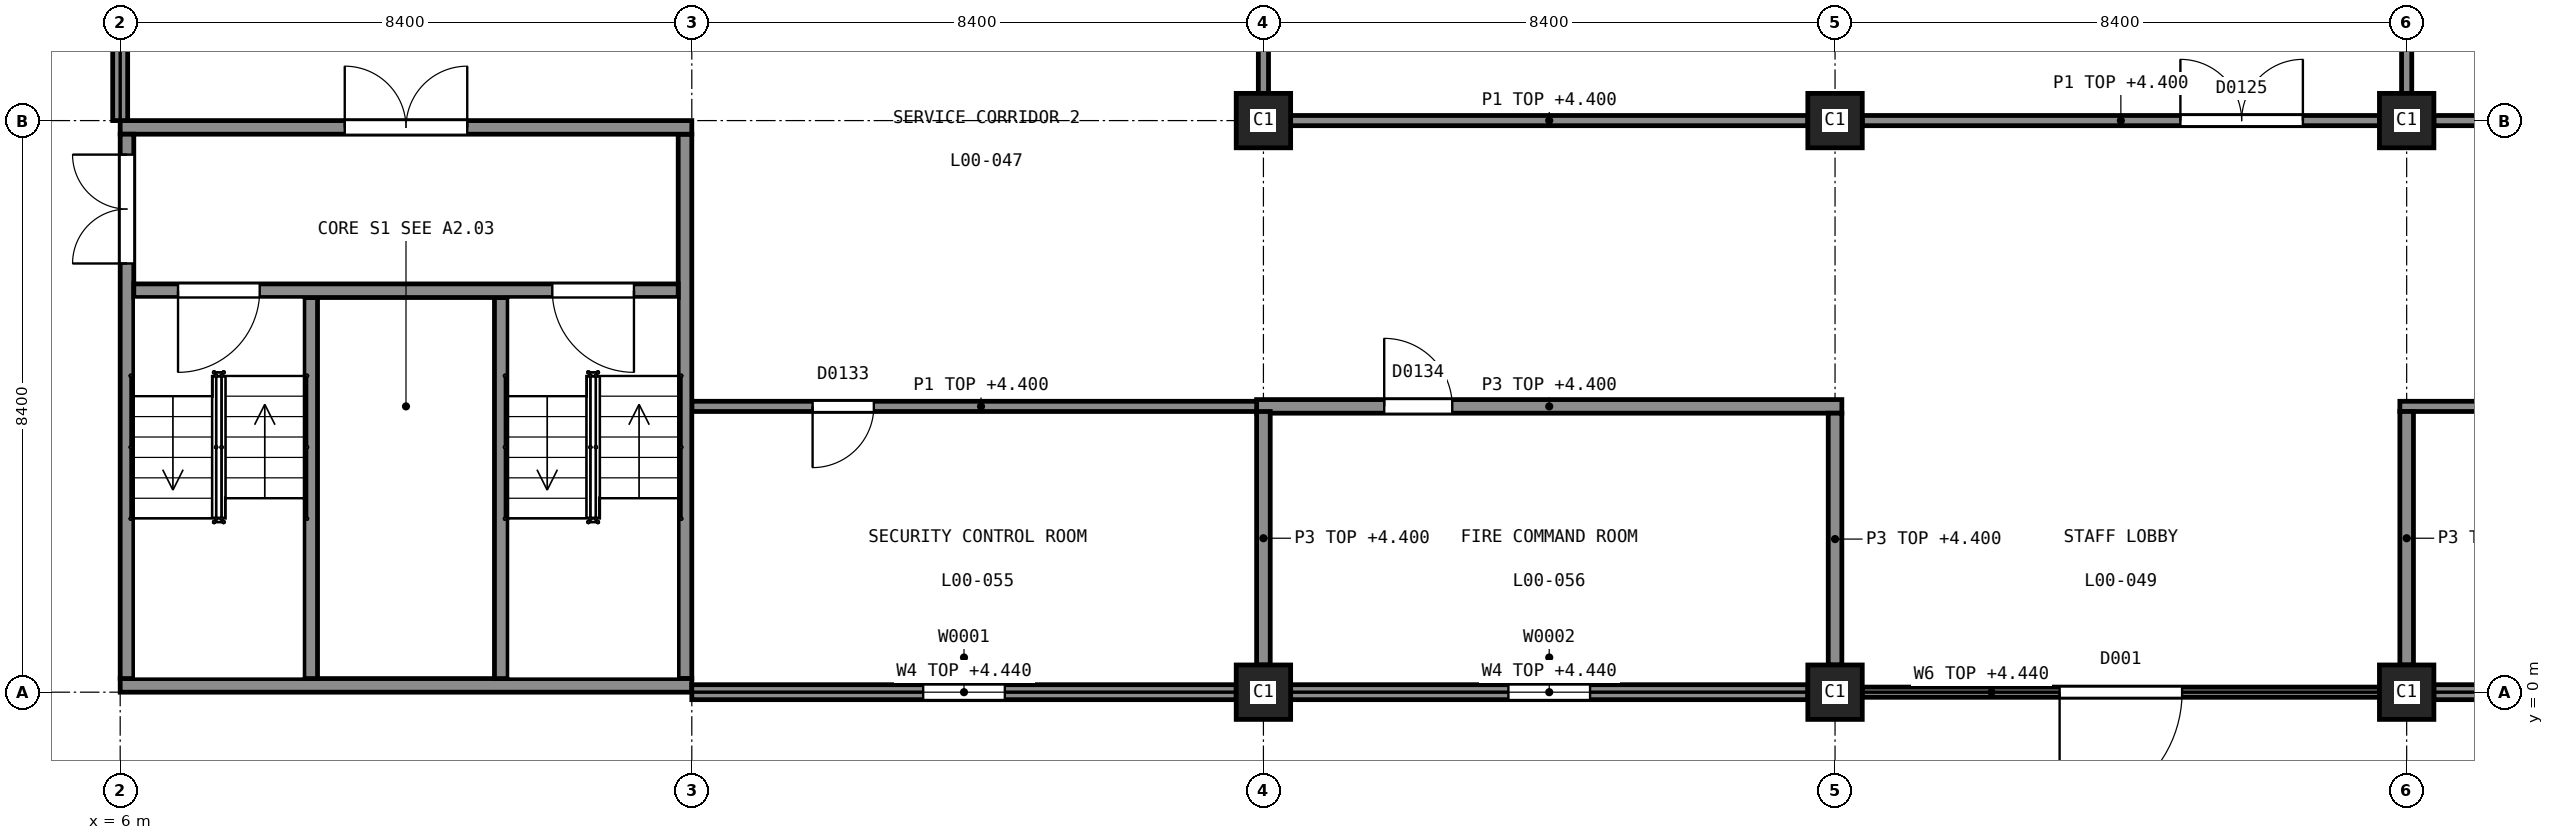
"""IFC4 building model, lengths in metres.
Left out: names, types, materials, properties, quantities, classifications, styles, units other than length and angle.
Written with IfcOpenShell. Run it as: python <this file> out.ifc"""

import sys

from ifc_helpers import new_model, si_unit, direction, frame, frame_2d, origin, origin_2d, place, context, subcontext, project, spatial, rectangle, extrude, element, fill, save


model = new_model("IFC4")
c1 = context("Model", 3, precision=1e-05, world=origin(), true_north=direction((0.0, 1.0)))
c2 = subcontext(c1, "Body", "Model", "MODEL_VIEW")
j1 = project(units=[si_unit("LENGTHUNIT", "METRE"), si_unit("PLANEANGLEUNIT", "RADIAN")], contexts=[c1])
p1 = place(None, origin())
s1 = spatial("IfcSite", under=j1, at=p1, CompositionType="ELEMENT")
p2 = place(p1, origin())
s2 = spatial("IfcBuilding", under=s1, at=p2, CompositionType="ELEMENT")
p3 = place(p2, origin())
s3 = spatial("IfcBuildingStorey", under=s2, at=p3, CompositionType="ELEMENT", Elevation=0.0)
p4 = place(p3, frame((6.0, 0.1, -1.8), z_axis=(0.0, 0.0, 1.0), x_axis=(1.0, 0.0, 0.0)))
e1 = element("IfcWall", 1, at=p4, inside=s3, PredefinedType="SHEAR", context=c2, shape_type="SweptSolid", body=[
    extrude(rectangle(XDim=8.4, YDim=0.2, at=frame_2d((4.2, 0.0))), origin(), (0.0, 0.0, 1.0), 7.3),
])
p5 = place(p3, frame((6.0, 8.3, -1.8), z_axis=(0.0, 0.0, 1.0), x_axis=(1.0, 0.0, 0.0)))
e2 = element("IfcWall", 2, at=p5, inside=s3, PredefinedType="SHEAR", context=c2, shape_type="SweptSolid", body=[
    extrude(rectangle(XDim=8.4, YDim=0.2, at=frame_2d((4.2, 0.0))), origin(), (0.0, 0.0, 1.0), 7.3),
])
p6 = place(p5, frame((3.3, 0.0, 1.8)))
e3 = element("IfcOpeningElement", 3, at=p6, cuts=e2, PredefinedType="OPENING", context=c2, shape_type="SweptSolid", body=[
    extrude(rectangle(XDim=1.8, YDim=2.1, at=frame_2d((0.9, 1.05))), frame((0.0, 0.11, 0.0), z_axis=(0.0, -1.0, 0.0), x_axis=(1.0, 0.0, 0.0)), (0.0, 0.0, 1.0), 0.22),
])
p7 = place(p3, frame((6.1, 0.2, -1.8), z_axis=(0.0, 0.0, 1.0), x_axis=(0.0, 1.0, 0.0)))
e4 = element("IfcWall", 4, at=p7, inside=s3, PredefinedType="SHEAR", context=c2, shape_type="SweptSolid", body=[
    extrude(rectangle(XDim=8.0, YDim=0.2, at=frame_2d((4.0, 0.0))), origin(), (0.0, 0.0, 1.0), 7.3),
])
p8 = place(p7, frame((6.1, 0.0, 1.8)))
e5 = element("IfcOpeningElement", 5, at=p8, cuts=e4, PredefinedType="OPENING", context=c2, shape_type="SweptSolid", body=[
    extrude(rectangle(XDim=1.6, YDim=2.1, at=frame_2d((0.8, 1.05))), frame((0.0, 0.11, 0.0), z_axis=(0.0, -1.0, 0.0), x_axis=(1.0, 0.0, 0.0)), (0.0, 0.0, 1.0), 0.22),
])
p9 = place(p3, frame((14.3, 0.2, -1.8), z_axis=(0.0, 0.0, 1.0), x_axis=(0.0, 1.0, 0.0)))
e6 = element("IfcWall", 6, at=p9, inside=s3, PredefinedType="SHEAR", context=c2, shape_type="SweptSolid", body=[
    extrude(rectangle(XDim=8.0, YDim=0.2, at=frame_2d((4.0, 0.0))), origin(), (0.0, 0.0, 1.0), 7.3),
])
p10 = place(p3, frame((6.2, 5.9, -1.8), z_axis=(0.0, 0.0, 1.0), x_axis=(1.0, 0.0, 0.0)))
e7 = element("IfcWall", 7, at=p10, inside=s3, PredefinedType="SHEAR", context=c2, shape_type="SweptSolid", body=[
    extrude(rectangle(XDim=8.0, YDim=0.2, at=frame_2d((4.0, 0.0))), origin(), (0.0, 0.0, 1.0), 7.3),
])
p11 = place(p10, frame((0.65, 0.0, 1.8)))
e8 = element("IfcOpeningElement", 8, at=p11, cuts=e7, PredefinedType="OPENING", context=c2, shape_type="SweptSolid", body=[
    extrude(rectangle(XDim=1.2, YDim=2.1, at=frame_2d((0.6, 1.05))), frame((0.0, 0.11, 0.0), z_axis=(0.0, -1.0, 0.0), x_axis=(1.0, 0.0, 0.0)), (0.0, 0.0, 1.0), 0.22),
])
p12 = place(p10, frame((6.15, 0.0, 1.8)))
e9 = element("IfcOpeningElement", 9, at=p12, cuts=e7, PredefinedType="OPENING", context=c2, shape_type="SweptSolid", body=[
    extrude(rectangle(XDim=1.2, YDim=2.1, at=frame_2d((0.6, 1.05))), frame((0.0, 0.11, 0.0), z_axis=(0.0, -1.0, 0.0), x_axis=(1.0, 0.0, 0.0)), (0.0, 0.0, 1.0), 0.22),
])
for number, where, z_axis, x_axis in (
    (10, (8.8, 0.2, -1.8), (0.0, 0.0, 1.0), (0.0, 1.0, 0.0)),
    (11, (11.6, 0.2, -1.8), (0.0, 0.0, 1.0), (0.0, 1.0, 0.0)),
):
    element("IfcWall", number, at=place(p3, frame(where, z_axis=z_axis, x_axis=x_axis)), inside=s3, PredefinedType="SHEAR", context=c2, shape_type="SweptSolid", body=[
        extrude(rectangle(XDim=5.6, YDim=0.2, at=frame_2d((2.8, 0.0))), origin(), (0.0, 0.0, 1.0), 7.3),
    ])
for number, where, z_axis, x_axis in (
    (12, (22.8, 0.0, -0.3), (0.0, 0.0, 1.0), (1.0, 0.0, 0.0)),
    (13, (22.8, 8.4, -0.3), (0.0, 0.0, 1.0), (1.0, 0.0, 0.0)),
    (14, (31.2, 0.0, -0.3), (0.0, 0.0, 1.0), (1.0, 0.0, 0.0)),
    (15, (31.2, 8.4, -0.3), (0.0, 0.0, 1.0), (1.0, 0.0, 0.0)),
    (16, (39.6, 0.0, -0.3), (0.0, 0.0, 1.0), (1.0, 0.0, 0.0)),
    (17, (39.6, 8.4, -0.3), (0.0, 0.0, 1.0), (1.0, 0.0, 0.0)),
):
    element("IfcColumn", number, at=place(p3, frame(where, z_axis=z_axis, x_axis=x_axis)), inside=s3, PredefinedType="COLUMN", context=c2, shape_type="SweptSolid", body=[
        extrude(rectangle(XDim=0.8, YDim=0.8, at=origin_2d()), origin(), (0.0, 0.0, 1.0), 5.8),
    ])
p13 = place(p3, frame((14.4, 0.0, 0.0), z_axis=(0.0, 0.0, 1.0), x_axis=(1.0, 0.0, 0.0)))
e18 = element("IfcWall", 18, at=p13, inside=s3, PredefinedType="SOLIDWALL", context=c2, shape_type="SweptSolid", body=[
    extrude(rectangle(XDim=8.0, YDim=0.22, at=frame_2d((4.0, 0.0))), origin(), (0.0, 0.0, 1.0), 4.44),
])
p14 = place(p13, frame((3.4, 0.0, 2.1)))
e19 = element("IfcOpeningElement", 19, at=p14, cuts=e18, PredefinedType="OPENING", context=c2, shape_type="SweptSolid", body=[
    extrude(rectangle(XDim=1.2, YDim=0.6, at=frame_2d((0.6, 0.3))), frame((0.0, 0.12, 0.0), z_axis=(0.0, -1.0, 0.0), x_axis=(1.0, 0.0, 0.0)), (0.0, 0.0, 1.0), 0.24),
])
p15 = place(p3, frame((23.2, 0.0, 0.0), z_axis=(0.0, 0.0, 1.0), x_axis=(1.0, 0.0, 0.0)))
e20 = element("IfcWall", 20, at=p15, inside=s3, PredefinedType="SOLIDWALL", context=c2, shape_type="SweptSolid", body=[
    extrude(rectangle(XDim=7.6, YDim=0.22, at=frame_2d((3.8, 0.0))), origin(), (0.0, 0.0, 1.0), 4.44),
])
p16 = place(p15, frame((3.2, 0.0, 2.1)))
e21 = element("IfcOpeningElement", 21, at=p16, cuts=e20, PredefinedType="OPENING", context=c2, shape_type="SweptSolid", body=[
    extrude(rectangle(XDim=1.2, YDim=0.6, at=frame_2d((0.6, 0.3))), frame((0.0, 0.12, 0.0), z_axis=(0.0, -1.0, 0.0), x_axis=(1.0, 0.0, 0.0)), (0.0, 0.0, 1.0), 0.24),
])
p17 = place(p3, frame((31.6, 0.0, 0.0), z_axis=(0.0, 0.0, 1.0), x_axis=(1.0, 0.0, 0.0)))
e22 = element("IfcWall", 22, at=p17, inside=s3, PredefinedType="ELEMENTEDWALL", context=c2, shape_type="SweptSolid", body=[
    extrude(rectangle(XDim=7.6, YDim=0.15, at=frame_2d((3.8, 0.0))), origin(), (0.0, 0.0, 1.0), 4.44),
])
p18 = place(p17, frame((2.9, 0.0, 0.0)))
e23 = element("IfcOpeningElement", 23, at=p18, cuts=e22, PredefinedType="OPENING", context=c2, shape_type="SweptSolid", body=[
    extrude(rectangle(XDim=1.8, YDim=2.1, at=frame_2d((0.9, 1.05))), frame((0.0, 0.085, 0.0), z_axis=(0.0, -1.0, 0.0), x_axis=(1.0, 0.0, 0.0)), (0.0, 0.0, 1.0), 0.17),
])
p19 = place(p3, frame((40.0, 0.0, 0.0), z_axis=(0.0, 0.0, 1.0), x_axis=(1.0, 0.0, 0.0)))
e24 = element("IfcWall", 24, at=p19, inside=s3, PredefinedType="SOLIDWALL", context=c2, shape_type="SweptSolid", body=[
    extrude(rectangle(XDim=7.6, YDim=0.22, at=frame_2d((3.8, 0.0))), origin(), (0.0, 0.0, 1.0), 4.44),
])
p20 = place(p19, frame((3.2, 0.0, 2.1)))
e25 = element("IfcOpeningElement", 25, at=p20, cuts=e24, PredefinedType="OPENING", context=c2, shape_type="SweptSolid", body=[
    extrude(rectangle(XDim=1.2, YDim=0.6, at=frame_2d((0.6, 0.3))), frame((0.0, 0.12, 0.0), z_axis=(0.0, -1.0, 0.0), x_axis=(1.0, 0.0, 0.0)), (0.0, 0.0, 1.0), 0.24),
])
p21 = place(p3, frame((6.0, 8.4, 0.0), z_axis=(0.0, 0.0, 1.0), x_axis=(0.0, 1.0, 0.0)))
e26 = element("IfcWall", 26, at=p21, inside=s3, PredefinedType="SOLIDWALL", context=c2, shape_type="SweptSolid", body=[
    extrude(rectangle(XDim=8.0, YDim=0.22, at=frame_2d((4.0, 0.0))), origin(), (0.0, 0.0, 1.0), 4.44),
])
p22 = place(p21, frame((2.85, 0.0, 2.1)))
e27 = element("IfcOpeningElement", 27, at=p22, cuts=e26, PredefinedType="OPENING", context=c2, shape_type="SweptSolid", body=[
    extrude(rectangle(XDim=1.2, YDim=0.6, at=frame_2d((0.6, 0.3))), frame((0.0, 0.12, 0.0), z_axis=(0.0, -1.0, 0.0), x_axis=(1.0, 0.0, 0.0)), (0.0, 0.0, 1.0), 0.24),
])
p23 = place(p3, frame((39.6, 8.8, 0.0), z_axis=(0.0, 0.0, 1.0), x_axis=(0.0, 1.0, 0.0)))
e28 = element("IfcWall", 28, at=p23, inside=s3, PredefinedType="PARTITIONING", context=c2, shape_type="SweptSolid", body=[
    extrude(rectangle(XDim=7.6, YDim=0.15, at=frame_2d((3.8, 0.0))), origin(), (0.0, 0.0, 1.0), 4.4),
])
p24 = place(p3, frame((23.2, 8.4, 0.0), z_axis=(0.0, 0.0, 1.0), x_axis=(1.0, 0.0, 0.0)))
e29 = element("IfcWall", 29, at=p24, inside=s3, PredefinedType="PARTITIONING", context=c2, shape_type="SweptSolid", body=[
    extrude(rectangle(XDim=7.6, YDim=0.15, at=frame_2d((3.8, 0.0))), origin(), (0.0, 0.0, 1.0), 4.4),
])
p25 = place(p3, frame((31.6, 8.4, 0.0), z_axis=(0.0, 0.0, 1.0), x_axis=(1.0, 0.0, 0.0)))
e30 = element("IfcWall", 30, at=p25, inside=s3, PredefinedType="PARTITIONING", context=c2, shape_type="SweptSolid", body=[
    extrude(rectangle(XDim=7.6, YDim=0.15, at=frame_2d((3.8, 0.0))), origin(), (0.0, 0.0, 1.0), 4.4),
])
p26 = place(p25, frame((4.675, 0.0, 0.0)))
e31 = element("IfcOpeningElement", 31, at=p26, cuts=e30, PredefinedType="OPENING", context=c2, shape_type="SweptSolid", body=[
    extrude(rectangle(XDim=1.8, YDim=2.1, at=frame_2d((0.9, 1.05))), frame((0.0, 0.085, 0.0), z_axis=(0.0, -1.0, 0.0), x_axis=(1.0, 0.0, 0.0)), (0.0, 0.0, 1.0), 0.17),
])
p27 = place(p3, frame((40.0, 8.4, 0.0), z_axis=(0.0, 0.0, 1.0), x_axis=(1.0, 0.0, 0.0)))
e32 = element("IfcWall", 32, at=p27, inside=s3, PredefinedType="PARTITIONING", context=c2, shape_type="SweptSolid", body=[
    extrude(rectangle(XDim=7.6, YDim=0.15, at=frame_2d((3.8, 0.0))), origin(), (0.0, 0.0, 1.0), 4.4),
])
p28 = place(p3, frame((22.8, 8.8, 0.0), z_axis=(0.0, 0.0, 1.0), x_axis=(0.0, 1.0, 0.0)))
e33 = element("IfcWall", 33, at=p28, inside=s3, PredefinedType="PARTITIONING", context=c2, shape_type="SweptSolid", body=[
    extrude(rectangle(XDim=3.7, YDim=0.15, at=frame_2d((1.85, 0.0))), origin(), (0.0, 0.0, 1.0), 4.4),
])
p29 = place(p3, frame((39.5, 4.2, 0.0), z_axis=(0.0, 0.0, 1.0), x_axis=(1.0, 0.0, 0.0)))
e34 = element("IfcWall", 34, at=p29, inside=s3, PredefinedType="PARTITIONING", context=c2, shape_type="SweptSolid", body=[
    extrude(rectangle(XDim=8.5, YDim=0.15, at=frame_2d((4.25, 0.0))), origin(), (0.0, 0.0, 1.0), 4.4),
])
p30 = place(p29, frame((5.788, 0.0, 0.0)))
e35 = element("IfcOpeningElement", 35, at=p30, cuts=e34, PredefinedType="OPENING", context=c2, shape_type="SweptSolid", body=[
    extrude(rectangle(XDim=0.9, YDim=2.1, at=frame_2d((0.45, 1.05))), frame((0.0, 0.085, 0.0), z_axis=(0.0, -1.0, 0.0), x_axis=(1.0, 0.0, 0.0)), (0.0, 0.0, 1.0), 0.17),
])
p31 = place(p3, frame((14.4, 4.2, 0.0), z_axis=(0.0, 0.0, 1.0), x_axis=(1.0, 0.0, 0.0)))
e36 = element("IfcWall", 36, at=p31, inside=s3, PredefinedType="PARTITIONING", context=c2, shape_type="SweptSolid", body=[
    extrude(rectangle(XDim=8.5, YDim=0.15, at=frame_2d((4.25, 0.0))), origin(), (0.0, 0.0, 1.0), 4.4),
])
p32 = place(p31, frame((1.775, 0.0, 0.0)))
e37 = element("IfcOpeningElement", 37, at=p32, cuts=e36, PredefinedType="OPENING", context=c2, shape_type="SweptSolid", body=[
    extrude(rectangle(XDim=0.9, YDim=2.1, at=frame_2d((0.45, 1.05))), frame((0.0, 0.085, 0.0), z_axis=(0.0, -1.0, 0.0), x_axis=(1.0, 0.0, 0.0)), (0.0, 0.0, 1.0), 0.17),
])
p33 = place(p3, frame((22.7, 4.2, 0.0), z_axis=(0.0, 0.0, 1.0), x_axis=(1.0, 0.0, 0.0)))
e38 = element("IfcWall", 38, at=p33, inside=s3, PredefinedType="PARTITIONING", context=c2, shape_type="SweptSolid", body=[
    extrude(rectangle(XDim=8.6, YDim=0.2, at=frame_2d((4.3, 0.0))), origin(), (0.0, 0.0, 1.0), 4.4),
])
p34 = place(p33, frame((1.875, 0.0, 0.0)))
e39 = element("IfcOpeningElement", 39, at=p34, cuts=e38, PredefinedType="OPENING", context=c2, shape_type="SweptSolid", body=[
    extrude(rectangle(XDim=1.0, YDim=2.1, at=frame_2d((0.5, 1.05))), frame((0.0, 0.11, 0.0), z_axis=(0.0, -1.0, 0.0), x_axis=(1.0, 0.0, 0.0)), (0.0, 0.0, 1.0), 0.22),
])
p35 = place(p3, frame((39.6, 0.4, 0.0), z_axis=(0.0, 0.0, 1.0), x_axis=(0.0, 1.0, 0.0)))
e40 = element("IfcWall", 40, at=p35, inside=s3, PredefinedType="PARTITIONING", context=c2, shape_type="SweptSolid", body=[
    extrude(rectangle(XDim=3.725, YDim=0.2, at=frame_2d((1.863, 0.0))), origin(), (0.0, 0.0, 1.0), 4.4),
])
p36 = place(p3, frame((31.2, 0.4, 0.0), z_axis=(0.0, 0.0, 1.0), x_axis=(0.0, 1.0, 0.0)))
e41 = element("IfcWall", 41, at=p36, inside=s3, PredefinedType="PARTITIONING", context=c2, shape_type="SweptSolid", body=[
    extrude(rectangle(XDim=3.7, YDim=0.2, at=frame_2d((1.85, 0.0))), origin(), (0.0, 0.0, 1.0), 4.4),
])
p37 = place(p3, frame((22.8, 0.4, 0.0), z_axis=(0.0, 0.0, 1.0), x_axis=(0.0, 1.0, 0.0)))
e42 = element("IfcWall", 42, at=p37, inside=s3, PredefinedType="PARTITIONING", context=c2, shape_type="SweptSolid", body=[
    extrude(rectangle(XDim=3.725, YDim=0.2, at=frame_2d((1.863, 0.0))), origin(), (0.0, 0.0, 1.0), 4.4),
])
p38 = place(p14, origin())
e43 = element("IfcWindow", 43, at=p38, inside=s3, PartitioningType="SINGLE_PANEL", PredefinedType="WINDOW", context=c2, shape_type="SweptSolid", body=[
    extrude(rectangle(XDim=1.2, YDim=0.6, at=frame_2d((0.6, 0.3))), frame((0.0, 0.09, 0.0), z_axis=(0.0, -1.0, 0.0), x_axis=(1.0, 0.0, 0.0)), (0.0, 0.0, 1.0), 0.06),
])
fill(e19, e43)
p39 = place(p16, origin())
e44 = element("IfcWindow", 44, at=p39, inside=s3, PartitioningType="SINGLE_PANEL", PredefinedType="WINDOW", context=c2, shape_type="SweptSolid", body=[
    extrude(rectangle(XDim=1.2, YDim=0.6, at=frame_2d((0.6, 0.3))), frame((0.0, 0.09, 0.0), z_axis=(0.0, -1.0, 0.0), x_axis=(1.0, 0.0, 0.0)), (0.0, 0.0, 1.0), 0.06),
])
fill(e21, e44)
p40 = place(p18, origin())
e45 = element("IfcDoor", 45, at=p40, inside=s3, OperationType="SINGLE_SWING_RIGHT", PredefinedType="DOOR", context=c2, shape_type="SweptSolid", body=[
    extrude(rectangle(XDim=1.8, YDim=2.1, at=frame_2d((0.9, 1.05))), frame((0.0, 0.025, 0.0), z_axis=(0.0, -1.0, 0.0), x_axis=(1.0, 0.0, 0.0)), (0.0, 0.0, 1.0), 0.05),
])
fill(e23, e45)
p41 = place(p8, origin())
e46 = element("IfcDoor", 46, at=p41, inside=s3, OperationType="DOUBLE_DOOR_SINGLE_SWING", PredefinedType="DOOR", context=c2, shape_type="SweptSolid", body=[
    extrude(rectangle(XDim=1.6, YDim=2.1, at=frame_2d((0.8, 1.05))), frame((0.0, 0.025, 0.0), z_axis=(0.0, -1.0, 0.0), x_axis=(1.0, 0.0, 0.0)), (0.0, 0.0, 1.0), 0.05),
])
fill(e5, e46)
p42 = place(p26, origin())
e47 = element("IfcDoor", 47, at=p42, inside=s3, OperationType="DOUBLE_DOOR_SINGLE_SWING", PredefinedType="DOOR", context=c2, shape_type="SweptSolid", body=[
    extrude(rectangle(XDim=1.8, YDim=2.1, at=frame_2d((0.9, 1.05))), frame((0.0, 0.025, 0.0), z_axis=(0.0, -1.0, 0.0), x_axis=(1.0, 0.0, 0.0)), (0.0, 0.0, 1.0), 0.05),
])
fill(e31, e47)
p43 = place(p32, origin())
e48 = element("IfcDoor", 48, at=p43, inside=s3, OperationType="SINGLE_SWING_LEFT", PredefinedType="DOOR", context=c2, shape_type="SweptSolid", body=[
    extrude(rectangle(XDim=0.9, YDim=2.1, at=frame_2d((0.45, 1.05))), frame((0.0, 0.025, 0.0), z_axis=(0.0, -1.0, 0.0), x_axis=(1.0, 0.0, 0.0)), (0.0, 0.0, 1.0), 0.05),
])
fill(e37, e48)
p44 = place(p34, origin())
e49 = element("IfcDoor", 49, at=p44, inside=s3, OperationType="SINGLE_SWING_RIGHT", PredefinedType="DOOR", context=c2, shape_type="SweptSolid", body=[
    extrude(rectangle(XDim=1.0, YDim=2.1, at=frame_2d((0.5, 1.05))), frame((0.0, 0.025, 0.0), z_axis=(0.0, -1.0, 0.0), x_axis=(1.0, 0.0, 0.0)), (0.0, 0.0, 1.0), 0.05),
])
fill(e39, e49)
p45 = place(p6, origin())
e50 = element("IfcDoor", 50, at=p45, inside=s3, OperationType="DOUBLE_DOOR_SINGLE_SWING", PredefinedType="DOOR", context=c2, shape_type="SweptSolid", body=[
    extrude(rectangle(XDim=1.8, YDim=2.1, at=frame_2d((0.9, 1.05))), frame((0.0, 0.025, 0.0), z_axis=(0.0, -1.0, 0.0), x_axis=(1.0, 0.0, 0.0)), (0.0, 0.0, 1.0), 0.05),
])
fill(e3, e50)
p46 = place(p11, origin())
e51 = element("IfcDoor", 51, at=p46, inside=s3, OperationType="SINGLE_SWING_LEFT", PredefinedType="DOOR", context=c2, shape_type="SweptSolid", body=[
    extrude(rectangle(XDim=1.2, YDim=2.1, at=frame_2d((0.6, 1.05))), frame((0.0, 0.025, 0.0), z_axis=(0.0, -1.0, 0.0), x_axis=(1.0, 0.0, 0.0)), (0.0, 0.0, 1.0), 0.05),
])
fill(e8, e51)
p47 = place(p12, origin())
e52 = element("IfcDoor", 52, at=p47, inside=s3, OperationType="SINGLE_SWING_RIGHT", PredefinedType="DOOR", context=c2, shape_type="SweptSolid", body=[
    extrude(rectangle(XDim=1.2, YDim=2.1, at=frame_2d((0.6, 1.05))), frame((0.0, 0.025, 0.0), z_axis=(0.0, -1.0, 0.0), x_axis=(1.0, 0.0, 0.0)), (0.0, 0.0, 1.0), 0.05),
])
fill(e9, e52)
save(model, sys.argv[1])
